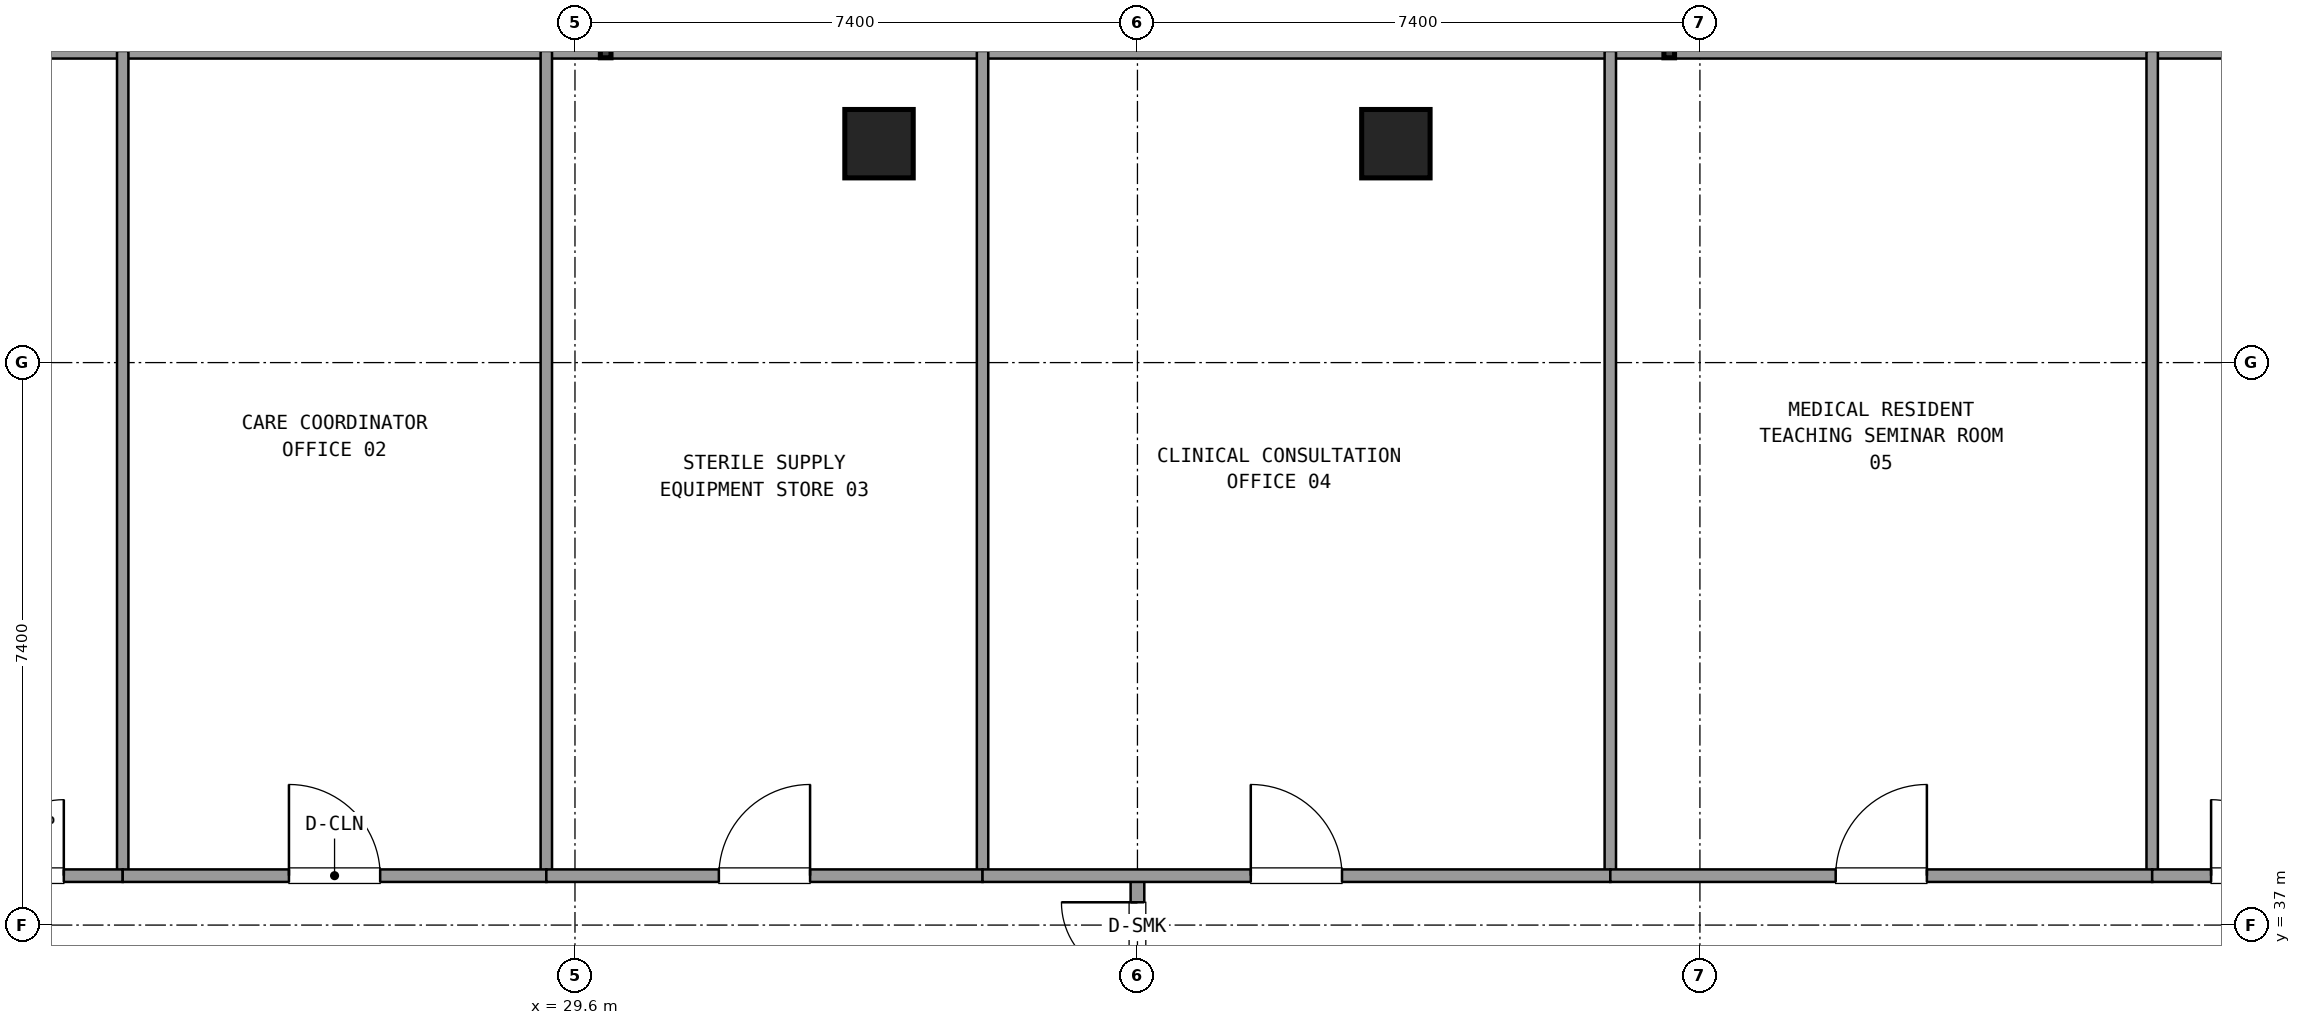
"""IFC4 building model, lengths in metres.
Left out: names, types, materials, properties, quantities, classifications, styles, units other than length and angle.
Written with IfcOpenShell. Run it as: python <this file> out.ifc"""

import sys

from ifc_helpers import new_model, si_unit, direction, frame, frame_2d, origin, origin_2d, place, context, subcontext, project, spatial, rectangle, extrude, element, fill, save


model = new_model("IFC4")
c1 = context("Model", 3, precision=1e-05, world=origin(), true_north=direction((0.0, 1.0)))
c2 = subcontext(c1, "Body", "Model", "MODEL_VIEW")
j1 = project(units=[si_unit("LENGTHUNIT", "METRE"), si_unit("PLANEANGLEUNIT", "RADIAN")], contexts=[c1])
p1 = place(None, origin())
s1 = spatial("IfcSite", under=j1, at=p1, CompositionType="ELEMENT")
p2 = place(p1, origin())
s2 = spatial("IfcBuilding", under=s1, at=p2, CompositionType="ELEMENT")
p3 = place(p2, frame((0.0, 0.0, 221.58)))
s3 = spatial("IfcBuildingStorey", under=s2, at=p3, CompositionType="ELEMENT", Elevation=221.58)
for number, where, z_axis, x_axis in (
    (1, (40.4, 47.28, 0.021), (0.0, 0.0, 1.0), (1.0, 0.0, 0.0)),
    (2, (33.6, 47.28, 0.021), (0.0, 0.0, 1.0), (1.0, 0.0, 0.0)),
):
    element("IfcColumn", number, at=place(p3, frame(where, z_axis=z_axis, x_axis=x_axis)), inside=s3, PredefinedType="COLUMN", context=c2, shape_type="SweptSolid", body=[
        extrude(rectangle(XDim=0.9, YDim=0.9, at=origin_2d()), origin(), (0.0, 0.0, 1.0), 3.579),
    ])
p4 = place(p3, frame((57.987, 48.52, 0.0), z_axis=(0.0, 0.0, 1.0), x_axis=(-1.0, 0.0, 0.0)))
e3 = element("IfcWall", 3, at=p4, inside=s3, PredefinedType="SOLIDWALL", context=c2, shape_type="SweptSolid", body=[
    extrude(rectangle(XDim=41.974, YDim=0.24, at=frame_2d((20.987, 0.0))), origin(), (0.0, 0.0, 1.0), 0.85),
])
p5 = place(p3, frame((37.0, 34.95, 0.0), z_axis=(0.0, 0.0, 1.0), x_axis=(0.0, 1.0, 0.0)))
e4 = element("IfcWall", 4, at=p5, inside=s3, PredefinedType="PARTITIONING", context=c2, shape_type="SweptSolid", body=[
    extrude(rectangle(XDim=2.7, YDim=0.18, at=frame_2d((1.35, 0.0))), origin(), (0.0, 0.0, 1.0), 2.61),
])
p6 = place(p5, frame((0.35, 0.0, 0.0)))
e5 = element("IfcOpeningElement", 5, at=p6, cuts=e4, PredefinedType="OPENING", context=c2, shape_type="SweptSolid", body=[
    extrude(rectangle(XDim=2.0, YDim=2.2, at=frame_2d((1.0, 1.1))), frame((0.0, 0.1, 0.0), z_axis=(0.0, -1.0, 0.0), x_axis=(1.0, 0.0, 0.0)), (0.0, 0.0, 1.0), 0.2),
])
p7 = place(p3, frame((23.65, 37.65, 0.0), z_axis=(0.0, 0.0, 1.0), x_axis=(0.0, 1.0, 0.0)))
e6 = element("IfcWall", 6, at=p7, inside=s3, PredefinedType="PARTITIONING", context=c2, shape_type="SweptSolid", body=[
    extrude(rectangle(XDim=10.85, YDim=0.15, at=frame_2d((5.425, 0.0))), origin(), (0.0, 0.0, 1.0), 2.61),
])
p8 = place(p3, frame((21.1, 37.65, 0.0), z_axis=(0.0, 0.0, 1.0), x_axis=(1.0, 0.0, 0.0)))
e7 = element("IfcWall", 7, at=p8, inside=s3, PredefinedType="PARTITIONING", context=c2, shape_type="SweptSolid", body=[
    extrude(rectangle(XDim=2.55, YDim=0.165, at=frame_2d((1.275, 0.0))), origin(), (0.0, 0.0, 1.0), 2.61),
])
p9 = place(p8, frame((0.775, 0.0, 0.0)))
e8 = element("IfcOpeningElement", 8, at=p9, cuts=e7, PredefinedType="OPENING", context=c2, shape_type="SweptSolid", body=[
    extrude(rectangle(XDim=1.0, YDim=2.15, at=frame_2d((0.5, 1.075))), frame((0.0, 0.093, 0.0), z_axis=(0.0, -1.0, 0.0), x_axis=(1.0, 0.0, 0.0)), (0.0, 0.0, 1.0), 0.185),
])
p10 = place(p3, frame((29.223, 37.65, 0.0), z_axis=(0.0, 0.0, 1.0), x_axis=(0.0, 1.0, 0.0)))
e9 = element("IfcWall", 9, at=p10, inside=s3, PredefinedType="PARTITIONING", context=c2, shape_type="SweptSolid", body=[
    extrude(rectangle(XDim=10.85, YDim=0.15, at=frame_2d((5.425, 0.0))), origin(), (0.0, 0.0, 1.0), 2.61),
])
p11 = place(p3, frame((23.65, 37.65, 0.0), z_axis=(0.0, 0.0, 1.0), x_axis=(1.0, 0.0, 0.0)))
e10 = element("IfcWall", 10, at=p11, inside=s3, PredefinedType="PARTITIONING", context=c2, shape_type="SweptSolid", body=[
    extrude(rectangle(XDim=5.573, YDim=0.165, at=frame_2d((2.787, 0.0))), origin(), (0.0, 0.0, 1.0), 2.61),
])
p12 = place(p11, frame((2.187, 0.0, 0.0)))
e11 = element("IfcOpeningElement", 11, at=p12, cuts=e10, PredefinedType="OPENING", context=c2, shape_type="SweptSolid", body=[
    extrude(rectangle(XDim=1.2, YDim=2.15, at=frame_2d((0.6, 1.075))), frame((0.0, 0.093, 0.0), z_axis=(0.0, -1.0, 0.0), x_axis=(1.0, 0.0, 0.0)), (0.0, 0.0, 1.0), 0.185),
])
p13 = place(p3, frame((34.962, 37.65, 0.0), z_axis=(0.0, 0.0, 1.0), x_axis=(0.0, 1.0, 0.0)))
e12 = element("IfcWall", 12, at=p13, inside=s3, PredefinedType="PARTITIONING", context=c2, shape_type="SweptSolid", body=[
    extrude(rectangle(XDim=10.85, YDim=0.15, at=frame_2d((5.425, 0.0))), origin(), (0.0, 0.0, 1.0), 2.61),
])
p14 = place(p3, frame((29.223, 37.65, 0.0), z_axis=(0.0, 0.0, 1.0), x_axis=(1.0, 0.0, 0.0)))
e13 = element("IfcWall", 13, at=p14, inside=s3, PredefinedType="PARTITIONING", context=c2, shape_type="SweptSolid", body=[
    extrude(rectangle(XDim=5.739, YDim=0.165, at=frame_2d((2.87, 0.0))), origin(), (0.0, 0.0, 1.0), 2.61),
])
p15 = place(p14, frame((2.27, 0.0, 0.0)))
e14 = element("IfcOpeningElement", 14, at=p15, cuts=e13, PredefinedType="OPENING", context=c2, shape_type="SweptSolid", body=[
    extrude(rectangle(XDim=1.2, YDim=2.15, at=frame_2d((0.6, 1.075))), frame((0.0, 0.093, 0.0), z_axis=(0.0, -1.0, 0.0), x_axis=(1.0, 0.0, 0.0)), (0.0, 0.0, 1.0), 0.185),
])
p16 = place(p3, frame((43.221, 37.65, 0.0), z_axis=(0.0, 0.0, 1.0), x_axis=(0.0, 1.0, 0.0)))
e15 = element("IfcWall", 15, at=p16, inside=s3, PredefinedType="PARTITIONING", context=c2, shape_type="SweptSolid", body=[
    extrude(rectangle(XDim=10.85, YDim=0.15, at=frame_2d((5.425, 0.0))), origin(), (0.0, 0.0, 1.0), 2.61),
])
p17 = place(p3, frame((34.962, 37.65, 0.0), z_axis=(0.0, 0.0, 1.0), x_axis=(1.0, 0.0, 0.0)))
e16 = element("IfcWall", 16, at=p17, inside=s3, PredefinedType="PARTITIONING", context=c2, shape_type="SweptSolid", body=[
    extrude(rectangle(XDim=8.259, YDim=0.165, at=frame_2d((4.129, 0.0))), origin(), (0.0, 0.0, 1.0), 2.61),
])
p18 = place(p17, frame((3.529, 0.0, 0.0)))
e17 = element("IfcOpeningElement", 17, at=p18, cuts=e16, PredefinedType="OPENING", context=c2, shape_type="SweptSolid", body=[
    extrude(rectangle(XDim=1.2, YDim=2.15, at=frame_2d((0.6, 1.075))), frame((0.0, 0.093, 0.0), z_axis=(0.0, -1.0, 0.0), x_axis=(1.0, 0.0, 0.0)), (0.0, 0.0, 1.0), 0.185),
])
p19 = place(p3, frame((50.35, 37.65, 0.0), z_axis=(0.0, 0.0, 1.0), x_axis=(0.0, 1.0, 0.0)))
e18 = element("IfcWall", 18, at=p19, inside=s3, PredefinedType="PARTITIONING", context=c2, shape_type="SweptSolid", body=[
    extrude(rectangle(XDim=10.85, YDim=0.15, at=frame_2d((5.425, 0.0))), origin(), (0.0, 0.0, 1.0), 2.61),
])
p20 = place(p3, frame((43.221, 37.65, 0.0), z_axis=(0.0, 0.0, 1.0), x_axis=(1.0, 0.0, 0.0)))
e19 = element("IfcWall", 19, at=p20, inside=s3, PredefinedType="PARTITIONING", context=c2, shape_type="SweptSolid", body=[
    extrude(rectangle(XDim=7.129, YDim=0.165, at=frame_2d((3.564, 0.0))), origin(), (0.0, 0.0, 1.0), 2.61),
])
p21 = place(p20, frame((2.965, 0.0, 0.0)))
e20 = element("IfcOpeningElement", 20, at=p21, cuts=e19, PredefinedType="OPENING", context=c2, shape_type="SweptSolid", body=[
    extrude(rectangle(XDim=1.2, YDim=2.15, at=frame_2d((0.6, 1.075))), frame((0.0, 0.093, 0.0), z_axis=(0.0, -1.0, 0.0), x_axis=(1.0, 0.0, 0.0)), (0.0, 0.0, 1.0), 0.185),
])
p22 = place(p3, frame((50.35, 37.65, 0.0), z_axis=(0.0, 0.0, 1.0), x_axis=(1.0, 0.0, 0.0)))
e21 = element("IfcWall", 21, at=p22, inside=s3, PredefinedType="PARTITIONING", context=c2, shape_type="SweptSolid", body=[
    extrude(rectangle(XDim=2.55, YDim=0.165, at=frame_2d((1.275, 0.0))), origin(), (0.0, 0.0, 1.0), 2.61),
])
p23 = place(p22, frame((0.775, 0.0, 0.0)))
e22 = element("IfcOpeningElement", 22, at=p23, cuts=e21, PredefinedType="OPENING", context=c2, shape_type="SweptSolid", body=[
    extrude(rectangle(XDim=1.0, YDim=2.15, at=frame_2d((0.5, 1.075))), frame((0.0, 0.093, 0.0), z_axis=(0.0, -1.0, 0.0), x_axis=(1.0, 0.0, 0.0)), (0.0, 0.0, 1.0), 0.185),
])
p24 = place(p6, origin())
e23 = element("IfcDoor", 23, at=p24, inside=s3, OperationType="DOUBLE_DOOR_SINGLE_SWING", PredefinedType="DOOR", context=c2, shape_type="SweptSolid", body=[
    extrude(rectangle(XDim=2.0, YDim=2.2, at=frame_2d((1.0, 1.1))), frame((0.0, 0.025, 0.0), z_axis=(0.0, -1.0, 0.0), x_axis=(1.0, 0.0, 0.0)), (0.0, 0.0, 1.0), 0.05),
])
fill(e5, e23)
p25 = place(p9, origin())
e24 = element("IfcDoor", 24, at=p25, inside=s3, OperationType="SINGLE_SWING_RIGHT", PredefinedType="DOOR", context=c2, shape_type="SweptSolid", body=[
    extrude(rectangle(XDim=1.0, YDim=2.15, at=frame_2d((0.5, 1.075))), frame((0.0, 0.025, 0.0), z_axis=(0.0, -1.0, 0.0), x_axis=(1.0, 0.0, 0.0)), (0.0, 0.0, 1.0), 0.05),
])
fill(e8, e24)
p26 = place(p12, origin())
e25 = element("IfcDoor", 25, at=p26, inside=s3, OperationType="SINGLE_SWING_LEFT", PredefinedType="DOOR", context=c2, shape_type="SweptSolid", body=[
    extrude(rectangle(XDim=1.2, YDim=2.15, at=frame_2d((0.6, 1.075))), frame((0.0, 0.025, 0.0), z_axis=(0.0, -1.0, 0.0), x_axis=(1.0, 0.0, 0.0)), (0.0, 0.0, 1.0), 0.05),
])
fill(e11, e25)
p27 = place(p15, origin())
e26 = element("IfcDoor", 26, at=p27, inside=s3, OperationType="SINGLE_SWING_RIGHT", PredefinedType="DOOR", context=c2, shape_type="SweptSolid", body=[
    extrude(rectangle(XDim=1.2, YDim=2.15, at=frame_2d((0.6, 1.075))), frame((0.0, 0.025, 0.0), z_axis=(0.0, -1.0, 0.0), x_axis=(1.0, 0.0, 0.0)), (0.0, 0.0, 1.0), 0.05),
])
fill(e14, e26)
p28 = place(p18, origin())
e27 = element("IfcDoor", 27, at=p28, inside=s3, OperationType="SINGLE_SWING_LEFT", PredefinedType="DOOR", context=c2, shape_type="SweptSolid", body=[
    extrude(rectangle(XDim=1.2, YDim=2.15, at=frame_2d((0.6, 1.075))), frame((0.0, 0.025, 0.0), z_axis=(0.0, -1.0, 0.0), x_axis=(1.0, 0.0, 0.0)), (0.0, 0.0, 1.0), 0.05),
])
fill(e17, e27)
p29 = place(p21, origin())
e28 = element("IfcDoor", 28, at=p29, inside=s3, OperationType="SINGLE_SWING_RIGHT", PredefinedType="DOOR", context=c2, shape_type="SweptSolid", body=[
    extrude(rectangle(XDim=1.2, YDim=2.15, at=frame_2d((0.6, 1.075))), frame((0.0, 0.025, 0.0), z_axis=(0.0, -1.0, 0.0), x_axis=(1.0, 0.0, 0.0)), (0.0, 0.0, 1.0), 0.05),
])
fill(e20, e28)
p30 = place(p23, origin())
e29 = element("IfcDoor", 29, at=p30, inside=s3, OperationType="SINGLE_SWING_LEFT", PredefinedType="DOOR", context=c2, shape_type="SweptSolid", body=[
    extrude(rectangle(XDim=1.0, YDim=2.15, at=frame_2d((0.5, 1.075))), frame((0.0, 0.025, 0.0), z_axis=(0.0, -1.0, 0.0), x_axis=(1.0, 0.0, 0.0)), (0.0, 0.0, 1.0), 0.05),
])
fill(e22, e29)
save(model, sys.argv[1])
